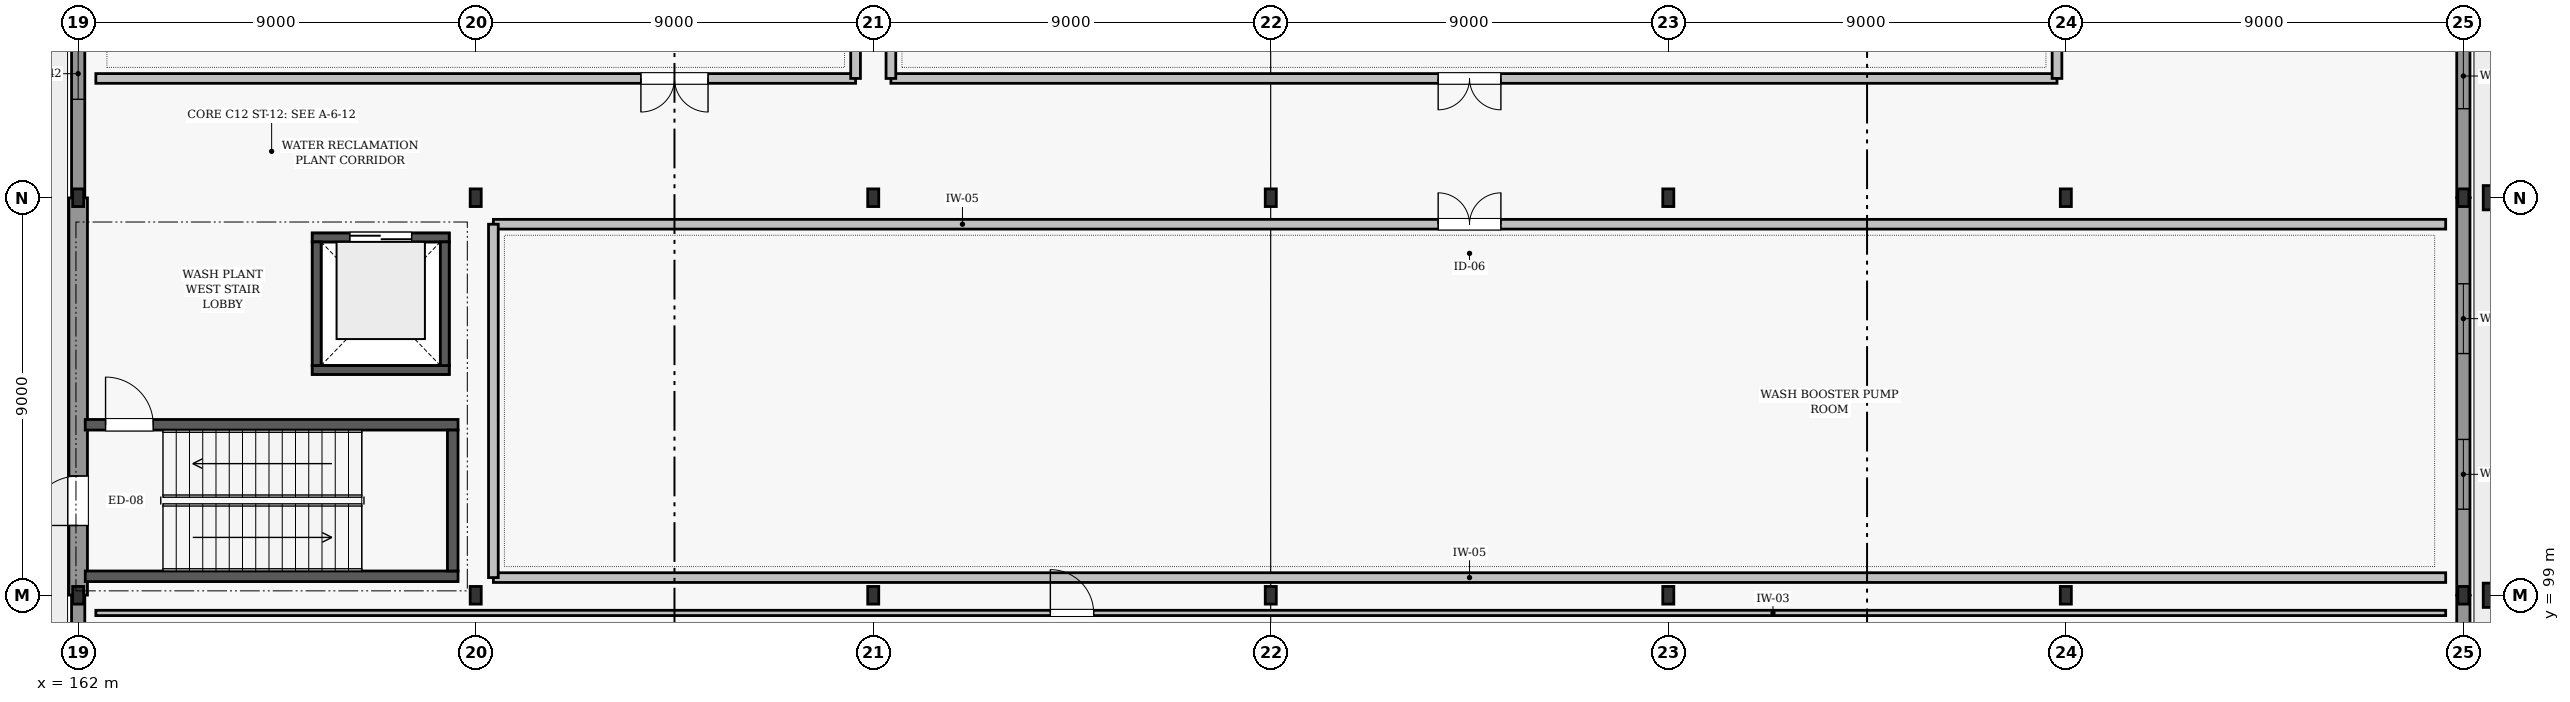
"""IFC4 building model, lengths in metres.
Left out: names, types, materials, properties, quantities, classifications, styles, units other than length and angle.
Written with IfcOpenShell. Run it as: python <this file> out.ifc"""

import sys

from ifc_helpers import new_model, si_unit, direction, frame, frame_2d, origin, origin_2d, place, context, subcontext, project, spatial, rectangle, i_section, extrude, element, fill, save


model = new_model("IFC4")
c1 = context("Model", 3, precision=1e-05, world=origin(), true_north=direction((0.0, 1.0)))
c2 = subcontext(c1, "Body", "Model", "MODEL_VIEW")
j1 = project(units=[si_unit("LENGTHUNIT", "METRE"), si_unit("PLANEANGLEUNIT", "RADIAN")], contexts=[c1])
p1 = place(None, origin())
s1 = spatial("IfcSite", under=j1, at=p1, CompositionType="ELEMENT")
p2 = place(p1, origin())
s2 = spatial("IfcBuilding", under=s1, at=p2, CompositionType="ELEMENT")
p3 = place(p2, origin())
s3 = spatial("IfcBuildingStorey", under=s2, at=p3, CompositionType="ELEMENT", Elevation=0.0)
for number, where, z_axis, x_axis in (
    (1, (162.0, 99.0, 0.0), (0.0, 0.0, 1.0), (1.0, 0.0, 0.0)),
    (2, (162.0, 108.0, 0.0), (0.0, 0.0, 1.0), (1.0, 0.0, 0.0)),
    (3, (171.0, 99.0, 0.0), (0.0, 0.0, 1.0), (1.0, 0.0, 0.0)),
    (4, (171.0, 108.0, 0.0), (0.0, 0.0, 1.0), (1.0, 0.0, 0.0)),
    (5, (180.0, 99.0, 0.0), (0.0, 0.0, 1.0), (1.0, 0.0, 0.0)),
    (6, (180.0, 108.0, 0.0), (0.0, 0.0, 1.0), (1.0, 0.0, 0.0)),
    (7, (189.0, 99.0, 0.0), (0.0, 0.0, 1.0), (1.0, 0.0, 0.0)),
    (8, (189.0, 108.0, 0.0), (0.0, 0.0, 1.0), (1.0, 0.0, 0.0)),
    (9, (198.0, 99.0, 0.0), (0.0, 0.0, 1.0), (1.0, 0.0, 0.0)),
    (10, (198.0, 108.0, 0.0), (0.0, 0.0, 1.0), (1.0, 0.0, 0.0)),
    (11, (207.0, 99.0, 0.0), (0.0, 0.0, 1.0), (1.0, 0.0, 0.0)),
    (12, (207.0, 108.0, 0.0), (0.0, 0.0, 1.0), (1.0, 0.0, 0.0)),
    (13, (216.0, 99.0, 0.0), (0.0, 0.0, 1.0), (1.0, 0.0, 0.0)),
    (14, (216.0, 108.0, 0.0), (0.0, 0.0, 1.0), (1.0, 0.0, 0.0)),
):
    element("IfcColumn", number, at=place(p3, frame(where, z_axis=z_axis, x_axis=x_axis)), inside=s3, PredefinedType="COLUMN", context=c2, shape_type="SweptSolid", body=[
        extrude(i_section(OverallWidth=0.25, OverallDepth=0.4, WebThickness=0.01, FlangeThickness=0.013, FilletRadius=0.014, at=origin_2d()), origin(), (0.0, 0.0, 1.0), 4.8),
    ])
for number, where, z_axis, x_axis in (
    (15, (216.85, 99.0, 0.0), (0.0, 0.0, 1.0), (0.0, 1.0, 0.0)),
    (16, (216.85, 108.0, 0.0), (0.0, 0.0, 1.0), (0.0, 1.0, 0.0)),
):
    element("IfcColumn", number, at=place(p3, frame(where, z_axis=z_axis, x_axis=x_axis)), inside=s3, PredefinedType="PILASTER", context=c2, shape_type="SweptSolid", body=[
        extrude(rectangle(XDim=0.55, YDim=0.8, at=origin_2d()), origin(), (0.0, 0.0, 1.0), 4.8),
    ])
p4 = place(p3, frame((162.0, 90.004, 0.0), z_axis=(0.0, 0.0, 1.0), x_axis=(0.0, 1.0, 0.0)))
e17 = element("IfcWall", 17, at=p4, inside=s3, PredefinedType="SOLIDWALL", context=c2, shape_type="SweptSolid", body=[
    extrude(rectangle(XDim=8.992, YDim=0.3, at=frame_2d((4.496, 0.0))), origin(), (0.0, 0.0, 1.0), 3.912),
])
p5 = place(p4, frame((2.696, 0.0, 0.0)))
e18 = element("IfcOpeningElement", 18, at=p5, cuts=e17, PredefinedType="OPENING", context=c2, shape_type="SweptSolid", body=[
    extrude(rectangle(XDim=3.6, YDim=3.45, at=frame_2d((1.8, 1.725))), frame((0.0, 0.16, 0.0), z_axis=(0.0, -1.0, 0.0), x_axis=(1.0, 0.0, 0.0)), (0.0, 0.0, 1.0), 0.32),
])
p6 = place(p3, frame((162.0, 99.004, 0.0), z_axis=(0.0, 0.0, 1.0), x_axis=(0.0, 1.0, 0.0)))
e19 = element("IfcWall", 19, at=p6, inside=s3, PredefinedType="SOLIDWALL", context=c2, shape_type="SweptSolid", body=[
    extrude(rectangle(XDim=8.992, YDim=0.42, at=frame_2d((4.496, 0.0))), origin(), (0.0, 0.0, 1.0), 3.912),
])
p7 = place(p6, frame((1.576, 0.0, 0.0)))
e20 = element("IfcOpeningElement", 20, at=p7, cuts=e19, PredefinedType="OPENING", context=c2, shape_type="SweptSolid", body=[
    extrude(rectangle(XDim=1.12, YDim=2.14, at=frame_2d((0.56, 1.07))), frame((0.0, 0.22, 0.0), z_axis=(0.0, -1.0, 0.0), x_axis=(1.0, 0.0, 0.0)), (0.0, 0.0, 1.0), 0.44),
])
p8 = place(p3, frame((162.0, 108.004, 0.0), z_axis=(0.0, 0.0, 1.0), x_axis=(0.0, 1.0, 0.0)))
e21 = element("IfcWall", 21, at=p8, inside=s3, PredefinedType="SOLIDWALL", context=c2, shape_type="SweptSolid", body=[
    extrude(rectangle(XDim=8.992, YDim=0.3, at=frame_2d((4.496, 0.0))), origin(), (0.0, 0.0, 1.0), 4.012),
])
p9 = place(p8, frame((2.224, 0.0, 0.85)))
e22 = element("IfcOpeningElement", 22, at=p9, cuts=e21, PredefinedType="OPENING", context=c2, shape_type="SweptSolid", body=[
    extrude(rectangle(XDim=1.16, YDim=1.4, at=frame_2d((0.58, 0.7))), frame((0.0, 0.16, 0.0), z_axis=(0.0, -1.0, 0.0), x_axis=(1.0, 0.0, 0.0)), (0.0, 0.0, 1.0), 0.32),
])
p10 = place(p8, frame((5.608, 0.0, 0.85)))
e23 = element("IfcOpeningElement", 23, at=p10, cuts=e21, PredefinedType="OPENING", context=c2, shape_type="SweptSolid", body=[
    extrude(rectangle(XDim=1.16, YDim=1.4, at=frame_2d((0.58, 0.7))), frame((0.0, 0.16, 0.0), z_axis=(0.0, -1.0, 0.0), x_axis=(1.0, 0.0, 0.0)), (0.0, 0.0, 1.0), 0.32),
])
p11 = place(p3, frame((216.0, 90.004, 0.0), z_axis=(0.0, 0.0, 1.0), x_axis=(0.0, 1.0, 0.0)))
e24 = element("IfcWall", 24, at=p11, inside=s3, PredefinedType="SOLIDWALL", context=c2, shape_type="SweptSolid", body=[
    extrude(rectangle(XDim=8.992, YDim=0.3, at=frame_2d((4.496, 0.0))), origin(), (0.0, 0.0, 1.0), 3.912),
])
p12 = place(p11, frame((2.696, 0.0, 0.0)))
e25 = element("IfcOpeningElement", 25, at=p12, cuts=e24, PredefinedType="OPENING", context=c2, shape_type="SweptSolid", body=[
    extrude(rectangle(XDim=3.6, YDim=3.45, at=frame_2d((1.8, 1.725))), frame((0.0, 0.16, 0.0), z_axis=(0.0, -1.0, 0.0), x_axis=(1.0, 0.0, 0.0)), (0.0, 0.0, 1.0), 0.32),
])
p13 = place(p3, frame((216.0, 99.004, 0.0), z_axis=(0.0, 0.0, 1.0), x_axis=(0.0, 1.0, 0.0)))
e26 = element("IfcWall", 26, at=p13, inside=s3, PredefinedType="SOLIDWALL", context=c2, shape_type="SweptSolid", body=[
    extrude(rectangle(XDim=8.992, YDim=0.3, at=frame_2d((4.496, 0.0))), origin(), (0.0, 0.0, 1.0), 3.912),
])
p14 = place(p13, frame((1.944, 0.0, 0.85)))
e27 = element("IfcOpeningElement", 27, at=p14, cuts=e26, PredefinedType="OPENING", context=c2, shape_type="SweptSolid", body=[
    extrude(rectangle(XDim=1.58, YDim=1.6, at=frame_2d((0.79, 0.8))), frame((0.0, 0.16, 0.0), z_axis=(0.0, -1.0, 0.0), x_axis=(1.0, 0.0, 0.0)), (0.0, 0.0, 1.0), 0.32),
])
p15 = place(p13, frame((5.468, 0.0, 0.85)))
e28 = element("IfcOpeningElement", 28, at=p15, cuts=e26, PredefinedType="OPENING", context=c2, shape_type="SweptSolid", body=[
    extrude(rectangle(XDim=1.58, YDim=1.6, at=frame_2d((0.79, 0.8))), frame((0.0, 0.16, 0.0), z_axis=(0.0, -1.0, 0.0), x_axis=(1.0, 0.0, 0.0)), (0.0, 0.0, 1.0), 0.32),
])
p16 = place(p3, frame((216.0, 108.004, 0.0), z_axis=(0.0, 0.0, 1.0), x_axis=(0.0, 1.0, 0.0)))
e29 = element("IfcWall", 29, at=p16, inside=s3, PredefinedType="SOLIDWALL", context=c2, shape_type="SweptSolid", body=[
    extrude(rectangle(XDim=8.992, YDim=0.3, at=frame_2d((4.496, 0.0))), origin(), (0.0, 0.0, 1.0), 4.012),
])
p17 = place(p16, frame((2.011, 0.0, 0.85)))
e30 = element("IfcOpeningElement", 30, at=p17, cuts=e29, PredefinedType="OPENING", context=c2, shape_type="SweptSolid", body=[
    extrude(rectangle(XDim=1.48, YDim=1.56, at=frame_2d((0.74, 0.78))), frame((0.0, 0.16, 0.0), z_axis=(0.0, -1.0, 0.0), x_axis=(1.0, 0.0, 0.0)), (0.0, 0.0, 1.0), 0.32),
])
p18 = place(p16, frame((5.501, 0.0, 0.85)))
e31 = element("IfcOpeningElement", 31, at=p18, cuts=e29, PredefinedType="OPENING", context=c2, shape_type="SweptSolid", body=[
    extrude(rectangle(XDim=1.48, YDim=1.56, at=frame_2d((0.74, 0.78))), frame((0.0, 0.16, 0.0), z_axis=(0.0, -1.0, 0.0), x_axis=(1.0, 0.0, 0.0)), (0.0, 0.0, 1.0), 0.32),
])
p19 = place(p3, frame((162.16, 99.43, 0.0), z_axis=(0.0, 0.0, 1.0), x_axis=(1.0, 0.0, 0.0)))
e32 = element("IfcWall", 32, at=p19, inside=s3, PredefinedType="SHEAR", context=c2, shape_type="SweptSolid", body=[
    extrude(rectangle(XDim=8.44, YDim=0.24, at=frame_2d((4.22, 0.0))), origin(), (0.0, 0.0, 1.0), 4.55),
])
p20 = place(p3, frame((162.16, 102.86, 0.0), z_axis=(0.0, 0.0, 1.0), x_axis=(1.0, 0.0, 0.0)))
e33 = element("IfcWall", 33, at=p20, inside=s3, PredefinedType="SHEAR", context=c2, shape_type="SweptSolid", body=[
    extrude(rectangle(XDim=8.44, YDim=0.24, at=frame_2d((4.22, 0.0))), origin(), (0.0, 0.0, 1.0), 4.55),
])
p21 = place(p20, frame((0.46, 0.0, 0.0)))
e34 = element("IfcOpeningElement", 34, at=p21, cuts=e33, PredefinedType="OPENING", context=c2, shape_type="SweptSolid", body=[
    extrude(rectangle(XDim=1.08, YDim=2.08, at=frame_2d((0.54, 1.04))), frame((0.0, 0.13, 0.0), z_axis=(0.0, -1.0, 0.0), x_axis=(1.0, 0.0, 0.0)), (0.0, 0.0, 1.0), 0.26),
])
p22 = place(p3, frame((170.48, 99.55, 0.0), z_axis=(0.0, 0.0, 1.0), x_axis=(0.0, 1.0, 0.0)))
e35 = element("IfcWall", 35, at=p22, inside=s3, PredefinedType="SHEAR", context=c2, shape_type="SweptSolid", body=[
    extrude(rectangle(XDim=3.19, YDim=0.24, at=frame_2d((1.595, 0.0))), origin(), (0.0, 0.0, 1.0), 4.55),
])
for number, where, z_axis, x_axis in (
    (36, (167.3, 104.1, -1.4), (0.0, 0.0, 1.0), (1.0, 0.0, 0.0)),
    (37, (167.3, 107.1, -1.4), (0.0, 0.0, 1.0), (1.0, 0.0, 0.0)),
):
    element("IfcWall", number, at=place(p3, frame(where, z_axis=z_axis, x_axis=x_axis)), inside=s3, PredefinedType="SHEAR", context=c2, shape_type="SweptSolid", body=[
        extrude(rectangle(XDim=3.1, YDim=0.2, at=frame_2d((1.55, 0.0))), origin(), (0.0, 0.0, 1.0), 1.1),
    ])
for number, where, z_axis, x_axis in (
    (38, (167.4, 104.2, -1.4), (0.0, 0.0, 1.0), (0.0, 1.0, 0.0)),
    (39, (170.3, 104.2, -1.4), (0.0, 0.0, 1.0), (0.0, 1.0, 0.0)),
):
    element("IfcWall", number, at=place(p3, frame(where, z_axis=z_axis, x_axis=x_axis)), inside=s3, PredefinedType="SHEAR", context=c2, shape_type="SweptSolid", body=[
        extrude(rectangle(XDim=2.8, YDim=0.2, at=frame_2d((1.4, 0.0))), origin(), (0.0, 0.0, 1.0), 1.1),
    ])
p23 = place(p3, frame((167.3, 104.1, 0.0), z_axis=(0.0, 0.0, 1.0), x_axis=(1.0, 0.0, 0.0)))
e40 = element("IfcWall", 40, at=p23, inside=s3, PredefinedType="SHEAR", context=c2, shape_type="SweptSolid", body=[
    extrude(rectangle(XDim=3.1, YDim=0.2, at=frame_2d((1.55, 0.0))), origin(), (0.0, 0.0, 1.0), 4.55),
])
p24 = place(p3, frame((167.3, 107.1, 0.0), z_axis=(0.0, 0.0, 1.0), x_axis=(1.0, 0.0, 0.0)))
e41 = element("IfcWall", 41, at=p24, inside=s3, PredefinedType="SHEAR", context=c2, shape_type="SweptSolid", body=[
    extrude(rectangle(XDim=3.1, YDim=0.2, at=frame_2d((1.55, 0.0))), origin(), (0.0, 0.0, 1.0), 4.55),
])
p25 = place(p24, frame((0.85, 0.0, 0.0)))
e42 = element("IfcOpeningElement", 42, at=p25, cuts=e41, PredefinedType="OPENING", context=c2, shape_type="SweptSolid", body=[
    extrude(rectangle(XDim=1.4, YDim=2.15, at=frame_2d((0.7, 1.075))), frame((0.0, 0.11, 0.0), z_axis=(0.0, -1.0, 0.0), x_axis=(1.0, 0.0, 0.0)), (0.0, 0.0, 1.0), 0.22),
])
for number, where, z_axis, x_axis in (
    (43, (167.4, 104.2, 0.0), (0.0, 0.0, 1.0), (0.0, 1.0, 0.0)),
    (44, (170.3, 104.2, 0.0), (0.0, 0.0, 1.0), (0.0, 1.0, 0.0)),
):
    element("IfcWall", number, at=place(p3, frame(where, z_axis=z_axis, x_axis=x_axis)), inside=s3, PredefinedType="SHEAR", context=c2, shape_type="SweptSolid", body=[
        extrude(rectangle(XDim=2.8, YDim=0.2, at=frame_2d((1.4, 0.0))), origin(), (0.0, 0.0, 1.0), 4.55),
    ])
p26 = place(p3, frame((162.4, 98.6, 0.0), z_axis=(0.0, 0.0, 1.0), x_axis=(1.0, 0.0, 0.0)))
e45 = element("IfcWall", 45, at=p26, inside=s3, PredefinedType="PARTITIONING", context=c2, shape_type="SweptSolid", body=[
    extrude(rectangle(XDim=53.2, YDim=0.12, at=frame_2d((26.6, 0.0))), origin(), (0.0, 0.0, 1.0), 4.045),
])
p27 = place(p26, frame((21.61, 0.0, 0.0)))
e46 = element("IfcOpeningElement", 46, at=p27, cuts=e45, PredefinedType="OPENING", context=c2, shape_type="SweptSolid", body=[
    extrude(rectangle(XDim=0.98, YDim=2.08, at=frame_2d((0.49, 1.04))), frame((0.0, 0.07, 0.0), z_axis=(0.0, -1.0, 0.0), x_axis=(1.0, 0.0, 0.0)), (0.0, 0.0, 1.0), 0.14),
])
p28 = place(p3, frame((171.4, 99.4, 0.0), z_axis=(0.0, 0.0, 1.0), x_axis=(1.0, 0.0, 0.0)))
e47 = element("IfcWall", 47, at=p28, inside=s3, PredefinedType="SOLIDWALL", context=c2, shape_type="SweptSolid", body=[
    extrude(rectangle(XDim=44.2, YDim=0.22, at=frame_2d((22.1, 0.0))), origin(), (0.0, 0.0, 1.0), 4.115),
])
p29 = place(p3, frame((171.4, 107.4, 0.0), z_axis=(0.0, 0.0, 1.0), x_axis=(1.0, 0.0, 0.0)))
e48 = element("IfcWall", 48, at=p29, inside=s3, PredefinedType="SOLIDWALL", context=c2, shape_type="SweptSolid", body=[
    extrude(rectangle(XDim=44.2, YDim=0.22, at=frame_2d((22.1, 0.0))), origin(), (0.0, 0.0, 1.0), 4.115),
])
p30 = place(p29, frame((21.39, 0.0, 0.0)))
e49 = element("IfcOpeningElement", 49, at=p30, cuts=e48, PredefinedType="OPENING", context=c2, shape_type="SweptSolid", body=[
    extrude(rectangle(XDim=1.42, YDim=2.12, at=frame_2d((0.71, 1.06))), frame((0.0, 0.12, 0.0), z_axis=(0.0, -1.0, 0.0), x_axis=(1.0, 0.0, 0.0)), (0.0, 0.0, 1.0), 0.24),
])
p31 = place(p3, frame((171.4, 99.4, 0.0), z_axis=(0.0, 0.0, 1.0), x_axis=(0.0, 1.0, 0.0)))
e50 = element("IfcWall", 50, at=p31, inside=s3, PredefinedType="SOLIDWALL", context=c2, shape_type="SweptSolid", body=[
    extrude(rectangle(XDim=8.0, YDim=0.22, at=frame_2d((4.0, 0.0))), origin(), (0.0, 0.0, 1.0), 4.55),
])
p32 = place(p3, frame((162.4, 110.7, 0.0), z_axis=(0.0, 0.0, 1.0), x_axis=(1.0, 0.0, 0.0)))
e51 = element("IfcWall", 51, at=p32, inside=s3, PredefinedType="SOLIDWALL", context=c2, shape_type="SweptSolid", body=[
    extrude(rectangle(XDim=17.2, YDim=0.22, at=frame_2d((8.6, 0.0))), origin(), (0.0, 0.0, 1.0), 4.115),
])
p33 = place(p32, frame((12.34, 0.0, 0.0)))
e52 = element("IfcOpeningElement", 52, at=p33, cuts=e51, PredefinedType="OPENING", context=c2, shape_type="SweptSolid", body=[
    extrude(rectangle(XDim=1.52, YDim=2.16, at=frame_2d((0.76, 1.08))), frame((0.0, 0.12, 0.0), z_axis=(0.0, -1.0, 0.0), x_axis=(1.0, 0.0, 0.0)), (0.0, 0.0, 1.0), 0.24),
])
p34 = place(p3, frame((179.6, 110.7, 0.0), z_axis=(0.0, 0.0, 1.0), x_axis=(0.0, 1.0, 0.0)))
e53 = element("IfcWall", 53, at=p34, inside=s3, PredefinedType="SOLIDWALL", context=c2, shape_type="SweptSolid", body=[
    extrude(rectangle(XDim=23.9, YDim=0.22, at=frame_2d((11.95, 0.0))), origin(), (0.0, 0.0, 1.0), 4.165),
])
p35 = place(p3, frame((180.4, 110.7, 0.0), z_axis=(0.0, 0.0, 1.0), x_axis=(1.0, 0.0, 0.0)))
e54 = element("IfcWall", 54, at=p35, inside=s3, PredefinedType="SOLIDWALL", context=c2, shape_type="SweptSolid", body=[
    extrude(rectangle(XDim=26.4, YDim=0.22, at=frame_2d((13.2, 0.0))), origin(), (0.0, 0.0, 1.0), 4.115),
])
p36 = place(p35, frame((12.39, 0.0, 0.0)))
e55 = element("IfcOpeningElement", 55, at=p36, cuts=e54, PredefinedType="OPENING", context=c2, shape_type="SweptSolid", body=[
    extrude(rectangle(XDim=1.42, YDim=2.12, at=frame_2d((0.71, 1.06))), frame((0.0, 0.12, 0.0), z_axis=(0.0, -1.0, 0.0), x_axis=(1.0, 0.0, 0.0)), (0.0, 0.0, 1.0), 0.24),
])
for number, where, z_axis, x_axis in (
    (56, (180.4, 110.7, 0.0), (0.0, 0.0, 1.0), (0.0, 1.0, 0.0)),
    (57, (206.8, 110.7, 0.0), (0.0, 0.0, 1.0), (0.0, 1.0, 0.0)),
):
    element("IfcWall", number, at=place(p3, frame(where, z_axis=z_axis, x_axis=x_axis)), inside=s3, PredefinedType="SOLIDWALL", context=c2, shape_type="SweptSolid", body=[
        extrude(rectangle(XDim=14.9, YDim=0.22, at=frame_2d((7.45, 0.0))), origin(), (0.0, 0.0, 1.0), 4.165),
    ])
p37 = place(p7, origin())
e58 = element("IfcDoor", 58, at=p37, inside=s3, OperationType="SINGLE_SWING_LEFT", PredefinedType="DOOR", context=c2, shape_type="SweptSolid", body=[
    extrude(rectangle(XDim=1.12, YDim=2.14, at=frame_2d((0.56, 1.07))), frame((0.0, 0.025, 0.0), z_axis=(0.0, -1.0, 0.0), x_axis=(1.0, 0.0, 0.0)), (0.0, 0.0, 1.0), 0.05),
])
fill(e20, e58)
p38 = place(p9, origin())
e59 = element("IfcWindow", 59, at=p38, inside=s3, PartitioningType="SINGLE_PANEL", PredefinedType="WINDOW", context=c2, shape_type="SweptSolid", body=[
    extrude(rectangle(XDim=1.16, YDim=1.4, at=frame_2d((0.58, 0.7))), frame((0.0, 0.03, 0.0), z_axis=(0.0, -1.0, 0.0), x_axis=(1.0, 0.0, 0.0)), (0.0, 0.0, 1.0), 0.06),
])
fill(e22, e59)
p39 = place(p14, origin())
e60 = element("IfcWindow", 60, at=p39, inside=s3, PartitioningType="SINGLE_PANEL", PredefinedType="WINDOW", context=c2, shape_type="SweptSolid", body=[
    extrude(rectangle(XDim=1.58, YDim=1.6, at=frame_2d((0.79, 0.8))), frame((0.0, 0.03, 0.0), z_axis=(0.0, -1.0, 0.0), x_axis=(1.0, 0.0, 0.0)), (0.0, 0.0, 1.0), 0.06),
])
fill(e27, e60)
p40 = place(p15, origin())
e61 = element("IfcWindow", 61, at=p40, inside=s3, PartitioningType="SINGLE_PANEL", PredefinedType="WINDOW", context=c2, shape_type="SweptSolid", body=[
    extrude(rectangle(XDim=1.58, YDim=1.6, at=frame_2d((0.79, 0.8))), frame((0.0, 0.03, 0.0), z_axis=(0.0, -1.0, 0.0), x_axis=(1.0, 0.0, 0.0)), (0.0, 0.0, 1.0), 0.06),
])
fill(e28, e61)
p41 = place(p17, origin())
e62 = element("IfcWindow", 62, at=p41, inside=s3, PartitioningType="SINGLE_PANEL", PredefinedType="WINDOW", context=c2, shape_type="SweptSolid", body=[
    extrude(rectangle(XDim=1.48, YDim=1.56, at=frame_2d((0.74, 0.78))), frame((0.0, 0.03, 0.0), z_axis=(0.0, -1.0, 0.0), x_axis=(1.0, 0.0, 0.0)), (0.0, 0.0, 1.0), 0.06),
])
fill(e30, e62)
p42 = place(p21, origin())
e63 = element("IfcDoor", 63, at=p42, inside=s3, OperationType="SINGLE_SWING_LEFT", PredefinedType="DOOR", context=c2, shape_type="SweptSolid", body=[
    extrude(rectangle(XDim=1.08, YDim=2.08, at=frame_2d((0.54, 1.04))), frame((0.0, 0.025, 0.0), z_axis=(0.0, -1.0, 0.0), x_axis=(1.0, 0.0, 0.0)), (0.0, 0.0, 1.0), 0.05),
])
fill(e34, e63)
p43 = place(p25, origin())
e64 = element("IfcDoor", 64, at=p43, inside=s3, OperationType="DOUBLE_DOOR_SLIDING", PredefinedType="DOOR", context=c2, shape_type="SweptSolid", body=[
    extrude(rectangle(XDim=1.4, YDim=2.15, at=frame_2d((0.7, 1.075))), frame((0.0, 0.025, 0.0), z_axis=(0.0, -1.0, 0.0), x_axis=(1.0, 0.0, 0.0)), (0.0, 0.0, 1.0), 0.05),
])
fill(e42, e64)
p44 = place(p27, origin())
e65 = element("IfcDoor", 65, at=p44, inside=s3, OperationType="SINGLE_SWING_LEFT", PredefinedType="DOOR", context=c2, shape_type="SweptSolid", body=[
    extrude(rectangle(XDim=0.98, YDim=2.08, at=frame_2d((0.49, 1.04))), frame((0.0, 0.025, 0.0), z_axis=(0.0, -1.0, 0.0), x_axis=(1.0, 0.0, 0.0)), (0.0, 0.0, 1.0), 0.05),
])
fill(e46, e65)
p45 = place(p30, origin())
e66 = element("IfcDoor", 66, at=p45, inside=s3, OperationType="DOUBLE_SWING_LEFT", PredefinedType="DOOR", context=c2, shape_type="SweptSolid", body=[
    extrude(rectangle(XDim=1.42, YDim=2.12, at=frame_2d((0.71, 1.06))), frame((0.0, 0.025, 0.0), z_axis=(0.0, -1.0, 0.0), x_axis=(1.0, 0.0, 0.0)), (0.0, 0.0, 1.0), 0.05),
])
fill(e49, e66)
p46 = place(p33, frame((1.52, 0.0, 0.0), z_axis=(0.0, 0.0, 1.0), x_axis=(-1.0, 0.0, 0.0)))
e67 = element("IfcDoor", 67, at=p46, inside=s3, OperationType="DOUBLE_SWING_LEFT", PredefinedType="DOOR", context=c2, shape_type="SweptSolid", body=[
    extrude(rectangle(XDim=1.52, YDim=2.16, at=frame_2d((0.76, 1.08))), frame((0.0, 0.025, 0.0), z_axis=(0.0, -1.0, 0.0), x_axis=(1.0, 0.0, 0.0)), (0.0, 0.0, 1.0), 0.05),
])
fill(e52, e67)
p47 = place(p36, frame((1.42, 0.0, 0.0), z_axis=(0.0, 0.0, 1.0), x_axis=(-1.0, 0.0, 0.0)))
e68 = element("IfcDoor", 68, at=p47, inside=s3, OperationType="DOUBLE_SWING_LEFT", PredefinedType="DOOR", context=c2, shape_type="SweptSolid", body=[
    extrude(rectangle(XDim=1.42, YDim=2.12, at=frame_2d((0.71, 1.06))), frame((0.0, 0.025, 0.0), z_axis=(0.0, -1.0, 0.0), x_axis=(1.0, 0.0, 0.0)), (0.0, 0.0, 1.0), 0.05),
])
fill(e55, e68)
save(model, sys.argv[1])
